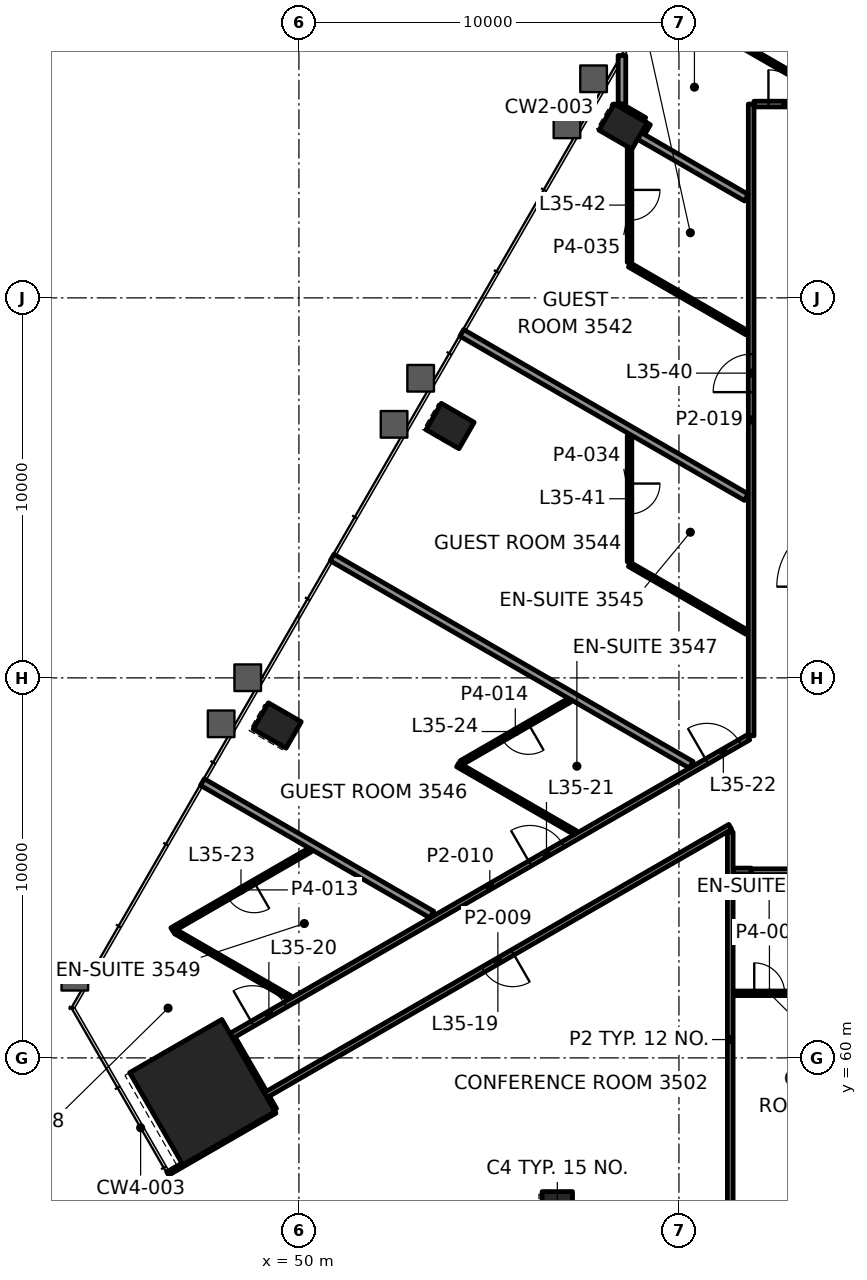
"""IFC4 building model, lengths in metres.
Left out: names, types, materials, properties, quantities, classifications, styles, units other than length and angle.
Written with IfcOpenShell. Run it as: python <this file> out.ifc"""

import sys

from ifc_helpers import new_model, si_unit, direction, frame, frame_2d, origin, origin_2d, place, context, subcontext, project, spatial, rectangle, hollow_rectangle, extrude, element, fill, save


model = new_model("IFC4")
c1 = context("Model", 3, precision=1e-05, world=origin(), true_north=direction((0.0, 1.0)))
c2 = subcontext(c1, "Body", "Model", "MODEL_VIEW")
j1 = project(units=[si_unit("LENGTHUNIT", "METRE"), si_unit("PLANEANGLEUNIT", "RADIAN")], contexts=[c1])
p1 = place(None, origin())
s1 = spatial("IfcSite", under=j1, at=p1, CompositionType="ELEMENT")
p2 = place(p1, origin())
s2 = spatial("IfcBuilding", under=s1, at=p2, CompositionType="ELEMENT")
p3 = place(p2, frame((0.0, 0.0, 155.8)))
s3 = spatial("IfcBuildingStorey", under=s2, at=p3, CompositionType="ELEMENT", Elevation=155.8)
p4 = place(p3, frame((47.459, 59.099, 0.0), z_axis=(0.0, 0.0, 1.0), x_axis=(0.5, -0.866025403784, 0.0)))
e1 = element("IfcColumn", 1, at=p4, inside=s3, PredefinedType="COLUMN", context=c2, shape_type="SweptSolid", body=[
    extrude(rectangle(XDim=2.8, YDim=2.8, at=origin_2d()), origin(), (0.0, 0.0, 1.0), 3.9),
])
for number, where, z_axis, x_axis in (
    (2, (56.8, 55.981, -0.0), (0.0, 0.0, 1.0), (1.0, 0.0, 0.0)),
    (3, (58.53, 84.509, -0.0), (0.0, 0.0, 1.0), (-0.5, -0.866, 0.0)),
    (4, (53.979, 76.628, -0.0), (0.0, 0.0, 1.0), (-0.5, -0.866, 0.0)),
    (5, (49.429, 68.748, -0.0), (0.0, 0.0, 1.0), (-0.5, -0.866, 0.0)),
):
    element("IfcColumn", number, at=place(p3, frame(where, z_axis=z_axis, x_axis=x_axis)), inside=s3, PredefinedType="COLUMN", context=c2, shape_type="SweptSolid", body=[
        extrude(hollow_rectangle(XDim=0.8, YDim=1.0, WallThickness=0.05, at=origin_2d()), origin(), (0.0, 0.0, 1.0), 3.9),
    ])
p5 = place(p3, frame((61.425, 61.7, 0.0), z_axis=(0.0, 0.0, 1.0), x_axis=(1.0, 0.0, 0.0)))
e6 = element("IfcWall", 6, at=p5, inside=s3, PredefinedType="PARTITIONING", context=c2, shape_type="SweptSolid", body=[
    extrude(rectangle(XDim=1.912, YDim=0.12, at=frame_2d((0.956, 0.0))), origin(), (0.0, 0.0, 1.0), 3.1),
])
p6 = place(p5, frame((0.556, 0.0, 0.0)))
e7 = element("IfcOpeningElement", 7, at=p6, cuts=e6, PredefinedType="OPENING", context=c2, shape_type="SweptSolid", body=[
    extrude(rectangle(XDim=0.8, YDim=2.1, at=frame_2d((0.4, 1.05))), frame((0.0, 0.07, 0.0), z_axis=(0.0, -1.0, 0.0), x_axis=(1.0, 0.0, 0.0)), (0.0, 0.0, 1.0), 0.14),
])
p7 = place(p3, frame((88.1, 64.9, 0.0), z_axis=(0.0, 0.0, 1.0), x_axis=(-1.0, 0.0, 0.0)))
e8 = element("IfcWall", 8, at=p7, inside=s3, PredefinedType="PARTITIONING", context=c2, shape_type="SweptSolid", body=[
    extrude(rectangle(XDim=26.2, YDim=0.15, at=frame_2d((13.1, 0.0))), origin(), (0.0, 0.0, 1.0), 3.1),
])
p8 = place(p7, frame((1.602, 0.0, 0.0)))
e9 = element("IfcOpeningElement", 9, at=p8, cuts=e8, PredefinedType="OPENING", context=c2, shape_type="SweptSolid", body=[
    extrude(rectangle(XDim=1.0, YDim=2.1, at=frame_2d((0.5, 1.05))), frame((0.0, 0.085, 0.0), z_axis=(0.0, -1.0, 0.0), x_axis=(1.0, 0.0, 0.0)), (0.0, 0.0, 1.0), 0.17),
])
p9 = place(p7, frame((4.411, 0.0, 0.0)))
e10 = element("IfcOpeningElement", 10, at=p9, cuts=e8, PredefinedType="OPENING", context=c2, shape_type="SweptSolid", body=[
    extrude(rectangle(XDim=1.0, YDim=2.1, at=frame_2d((0.5, 1.05))), frame((0.0, 0.085, 0.0), z_axis=(0.0, -1.0, 0.0), x_axis=(1.0, 0.0, 0.0)), (0.0, 0.0, 1.0), 0.17),
])
p10 = place(p7, frame((12.081, 0.0, 0.0)))
e11 = element("IfcOpeningElement", 11, at=p10, cuts=e8, PredefinedType="OPENING", context=c2, shape_type="SweptSolid", body=[
    extrude(rectangle(XDim=0.9, YDim=2.1, at=frame_2d((0.45, 1.05))), frame((0.0, 0.085, 0.0), z_axis=(0.0, -1.0, 0.0), x_axis=(1.0, 0.0, 0.0)), (0.0, 0.0, 1.0), 0.17),
])
p11 = place(p7, frame((15.494, 0.0, 0.0)))
e12 = element("IfcOpeningElement", 12, at=p11, cuts=e8, PredefinedType="OPENING", context=c2, shape_type="SweptSolid", body=[
    extrude(rectangle(XDim=0.9, YDim=2.1, at=frame_2d((0.45, 1.05))), frame((0.0, 0.085, 0.0), z_axis=(0.0, -1.0, 0.0), x_axis=(1.0, 0.0, 0.0)), (0.0, 0.0, 1.0), 0.17),
])
p12 = place(p7, frame((17.873, 0.0, 0.0)))
e13 = element("IfcOpeningElement", 13, at=p12, cuts=e8, PredefinedType="OPENING", context=c2, shape_type="SweptSolid", body=[
    extrude(rectangle(XDim=1.0, YDim=2.1, at=frame_2d((0.5, 1.05))), frame((0.0, 0.085, 0.0), z_axis=(0.0, -1.0, 0.0), x_axis=(1.0, 0.0, 0.0)), (0.0, 0.0, 1.0), 0.17),
])
p13 = place(p7, frame((22.423, 0.0, 0.0)))
e14 = element("IfcOpeningElement", 14, at=p13, cuts=e8, PredefinedType="OPENING", context=c2, shape_type="SweptSolid", body=[
    extrude(rectangle(XDim=1.0, YDim=2.1, at=frame_2d((0.5, 1.05))), frame((0.0, 0.085, 0.0), z_axis=(0.0, -1.0, 0.0), x_axis=(1.0, 0.0, 0.0)), (0.0, 0.0, 1.0), 0.17),
])
p14 = place(p3, frame((61.425, 64.919, 0.0), z_axis=(0.0, 0.0, 1.0), x_axis=(1.0, 0.0, 0.0)))
e15 = element("IfcWall", 15, at=p14, inside=s3, PredefinedType="PARTITIONING", context=c2, shape_type="SweptSolid", body=[
    extrude(rectangle(XDim=0.475, YDim=0.15, at=frame_2d((0.237, 0.0))), origin(), (0.0, 0.0, 1.0), 3.1),
])
p15 = place(p3, frame((61.975, 85.1, 0.0), z_axis=(0.0, 0.0, 1.0), x_axis=(1.0, 0.0, 0.0)))
e16 = element("IfcWall", 16, at=p15, inside=s3, PredefinedType="PARTITIONING", context=c2, shape_type="SweptSolid", body=[
    extrude(rectangle(XDim=9.181, YDim=0.15, at=frame_2d((4.591, 0.0))), origin(), (0.0, 0.0, 1.0), 3.1),
])
p16 = place(p15, frame((0.38, 0.0, 0.0)))
e17 = element("IfcOpeningElement", 17, at=p16, cuts=e16, PredefinedType="OPENING", context=c2, shape_type="SweptSolid", body=[
    extrude(rectangle(XDim=0.9, YDim=2.1, at=frame_2d((0.45, 1.05))), frame((0.0, 0.085, 0.0), z_axis=(0.0, -1.0, 0.0), x_axis=(1.0, 0.0, 0.0)), (0.0, 0.0, 1.0), 0.17),
])
p17 = place(p15, frame((5.216, 0.0, 0.0)))
e18 = element("IfcOpeningElement", 18, at=p17, cuts=e16, PredefinedType="OPENING", context=c2, shape_type="SweptSolid", body=[
    extrude(rectangle(XDim=0.9, YDim=2.1, at=frame_2d((0.45, 1.05))), frame((0.0, 0.085, 0.0), z_axis=(0.0, -1.0, 0.0), x_axis=(1.0, 0.0, 0.0)), (0.0, 0.0, 1.0), 0.17),
])
p18 = place(p3, frame((46.548, 56.957, 0.0), z_axis=(0.0, 0.0, 1.0), x_axis=(0.866035906198, 0.499981808845, 0.0)))
e19 = element("IfcWall", 19, at=p18, inside=s3, PredefinedType="PARTITIONING", context=c2, shape_type="SweptSolid", body=[
    extrude(rectangle(XDim=3.259, YDim=0.1, at=frame_2d((1.63, 0.0))), origin(), (0.0, 0.0, 1.0), 3.1),
])
p19 = place(p3, frame((61.35, 66.08, 0.0), z_axis=(0.0, 0.0, 1.0), x_axis=(-0.86602031485, -0.50000881419, 0.0)))
e20 = element("IfcWall", 20, at=p19, inside=s3, PredefinedType="PARTITIONING", context=c2, shape_type="SweptSolid", body=[
    extrude(rectangle(XDim=14.12, YDim=0.15, at=frame_2d((7.06, 0.0))), origin(), (0.0, 0.0, 1.0), 2.947),
])
p20 = place(p19, frame((6.61, 0.0, 0.0)))
e21 = element("IfcOpeningElement", 21, at=p20, cuts=e20, PredefinedType="OPENING", context=c2, shape_type="SweptSolid", body=[
    extrude(rectangle(XDim=0.9, YDim=2.1, at=frame_2d((0.45, 1.05))), frame((0.0, 0.085, 0.0), z_axis=(0.0, -1.0, 0.0), x_axis=(1.0, 0.0, 0.0)), (0.0, 0.0, 1.0), 0.17),
])
p21 = place(p3, frame((48.222, 60.579, 0.0), z_axis=(0.0, 0.0, 1.0), x_axis=(0.866027958894, 0.499995574394, 0.0)))
e22 = element("IfcWall", 22, at=p21, inside=s3, PredefinedType="PARTITIONING", context=c2, shape_type="SweptSolid", body=[
    extrude(rectangle(XDim=15.708, YDim=0.15, at=frame_2d((7.854, 0.0))), origin(), (0.0, 0.0, 1.0), 3.1),
])
p22 = place(p21, frame((0.641, 0.0, 0.0)))
e23 = element("IfcOpeningElement", 23, at=p22, cuts=e22, PredefinedType="OPENING", context=c2, shape_type="SweptSolid", body=[
    extrude(rectangle(XDim=1.0, YDim=2.1, at=frame_2d((0.5, 1.05))), frame((0.0, 0.085, 0.0), z_axis=(0.0, -1.0, 0.0), x_axis=(1.0, 0.0, 0.0)), (0.0, 0.0, 1.0), 0.17),
])
p23 = place(p21, frame((9.075, 0.0, 0.0)))
e24 = element("IfcOpeningElement", 24, at=p23, cuts=e22, PredefinedType="OPENING", context=c2, shape_type="SweptSolid", body=[
    extrude(rectangle(XDim=1.0, YDim=2.1, at=frame_2d((0.5, 1.05))), frame((0.0, 0.085, 0.0), z_axis=(0.0, -1.0, 0.0), x_axis=(1.0, 0.0, 0.0)), (0.0, 0.0, 1.0), 0.17),
])
p24 = place(p21, frame((14.449, 0.0, 0.0)))
e25 = element("IfcOpeningElement", 25, at=p24, cuts=e22, PredefinedType="OPENING", context=c2, shape_type="SweptSolid", body=[
    extrude(rectangle(XDim=1.0, YDim=2.1, at=frame_2d((0.5, 1.05))), frame((0.0, 0.085, 0.0), z_axis=(0.0, -1.0, 0.0), x_axis=(1.0, 0.0, 0.0)), (0.0, 0.0, 1.0), 0.17),
])
p25 = place(p3, frame((50.29, 65.468, 0.0), z_axis=(0.0, 0.0, 1.0), x_axis=(-0.866011945653, -0.500023309443, 0.0)))
e26 = element("IfcWall", 26, at=p25, inside=s3, PredefinedType="PARTITIONING", context=c2, shape_type="SweptSolid", body=[
    extrude(rectangle(XDim=4.191, YDim=0.12, at=frame_2d((2.096, 0.0))), origin(), (0.0, 0.0, 1.0), 3.1),
])
p26 = place(p25, frame((1.696, 0.0, 0.0)))
e27 = element("IfcOpeningElement", 27, at=p26, cuts=e26, PredefinedType="OPENING", context=c2, shape_type="SweptSolid", body=[
    extrude(rectangle(XDim=0.8, YDim=2.1, at=frame_2d((0.4, 1.05))), frame((0.0, 0.07, 0.0), z_axis=(0.0, -1.0, 0.0), x_axis=(1.0, 0.0, 0.0)), (0.0, 0.0, 1.0), 0.14),
])
p27 = place(p3, frame((57.115, 69.409, 0.0), z_axis=(0.0, 0.0, 1.0), x_axis=(-0.866004692627, -0.500035871061, 0.0)))
e28 = element("IfcWall", 28, at=p27, inside=s3, PredefinedType="PARTITIONING", context=c2, shape_type="SweptSolid", body=[
    extrude(rectangle(XDim=3.281, YDim=0.12, at=frame_2d((1.641, 0.0))), origin(), (0.0, 0.0, 1.0), 3.1),
])
p28 = place(p27, frame((1.241, 0.0, 0.0)))
e29 = element("IfcOpeningElement", 29, at=p28, cuts=e28, PredefinedType="OPENING", context=c2, shape_type="SweptSolid", body=[
    extrude(rectangle(XDim=0.8, YDim=2.1, at=frame_2d((0.4, 1.05))), frame((0.0, 0.07, 0.0), z_axis=(0.0, -1.0, 0.0), x_axis=(1.0, 0.0, 0.0)), (0.0, 0.0, 1.0), 0.14),
])
p29 = place(p3, frame((59.017, 84.355, 0.0), z_axis=(0.0, 0.0, 1.0), x_axis=(0.500038750527, 0.866003030001, 0.0)))
e30 = element("IfcWall", 30, at=p29, inside=s3, PredefinedType="PARTITIONING", context=c2, shape_type="SweptSolid", body=[
    extrude(rectangle(XDim=0.29, YDim=0.2, at=frame_2d((0.145, 0.0))), origin(), (0.0, 0.0, 1.0), 3.1),
])
p30 = place(p3, frame((61.9, 68.476, 0.0), z_axis=(0.0, 0.0, 1.0), x_axis=(0.0, 1.0, 0.0)))
e31 = element("IfcWall", 31, at=p30, inside=s3, PredefinedType="PARTITIONING", context=c2, shape_type="SweptSolid", body=[
    extrude(rectangle(XDim=16.624, YDim=0.15, at=frame_2d((8.312, 0.0))), origin(), (0.0, 0.0, 1.0), 3.1),
])
p31 = place(p30, frame((9.043, 0.0, 0.0)))
e32 = element("IfcOpeningElement", 32, at=p31, cuts=e31, PredefinedType="OPENING", context=c2, shape_type="SweptSolid", body=[
    extrude(rectangle(XDim=1.0, YDim=2.1, at=frame_2d((0.5, 1.05))), frame((0.0, 0.085, 0.0), z_axis=(0.0, -1.0, 0.0), x_axis=(1.0, 0.0, 0.0)), (0.0, 0.0, 1.0), 0.17),
])
p32 = place(p3, frame((61.35, 55.021, 0.0), z_axis=(0.0, 0.0, 1.0), x_axis=(0.0, 1.0, 0.0)))
e33 = element("IfcWall", 33, at=p32, inside=s3, PredefinedType="PARTITIONING", context=c2, shape_type="SweptSolid", body=[
    extrude(rectangle(XDim=10.922, YDim=0.15, at=frame_2d((5.461, 0.0))), origin(), (0.0, 0.0, 1.0), 2.865),
])
p33 = place(p3, frame((58.7, 76.375, 0.0), z_axis=(0.0, 0.0, 1.0), x_axis=(0.0, -1.0, 0.0)))
e34 = element("IfcWall", 34, at=p33, inside=s3, PredefinedType="PARTITIONING", context=c2, shape_type="SweptSolid", body=[
    extrude(rectangle(XDim=3.322, YDim=0.12, at=frame_2d((1.661, 0.0))), origin(), (0.0, 0.0, 1.0), 3.1),
])
p34 = place(p33, frame((1.261, 0.0, 0.0)))
e35 = element("IfcOpeningElement", 35, at=p34, cuts=e34, PredefinedType="OPENING", context=c2, shape_type="SweptSolid", body=[
    extrude(rectangle(XDim=0.8, YDim=2.1, at=frame_2d((0.4, 1.05))), frame((0.0, 0.07, 0.0), z_axis=(0.0, -1.0, 0.0), x_axis=(1.0, 0.0, 0.0)), (0.0, 0.0, 1.0), 0.14),
])
p35 = place(p3, frame((58.7, 83.949, 0.0), z_axis=(0.0, 0.0, 1.0), x_axis=(0.0, -1.0, 0.0)))
e36 = element("IfcWall", 36, at=p35, inside=s3, PredefinedType="PARTITIONING", context=c2, shape_type="SweptSolid", body=[
    extrude(rectangle(XDim=3.015, YDim=0.12, at=frame_2d((1.508, 0.0))), origin(), (0.0, 0.0, 1.0), 3.1),
])
p36 = place(p35, frame((1.108, 0.0, 0.0)))
e37 = element("IfcOpeningElement", 37, at=p36, cuts=e36, PredefinedType="OPENING", context=c2, shape_type="SweptSolid", body=[
    extrude(rectangle(XDim=0.8, YDim=2.1, at=frame_2d((0.4, 1.05))), frame((0.0, 0.07, 0.0), z_axis=(0.0, -1.0, 0.0), x_axis=(1.0, 0.0, 0.0)), (0.0, 0.0, 1.0), 0.14),
])
p37 = place(p3, frame((58.5, 85.104, 0.0), z_axis=(0.0, 0.0, 1.0), x_axis=(0.0, 1.0, 0.0)))
e38 = element("IfcWall", 38, at=p37, inside=s3, PredefinedType="PARTITIONING", context=c2, shape_type="SweptSolid", body=[
    extrude(rectangle(XDim=1.274, YDim=0.2, at=frame_2d((0.637, 0.0))), origin(), (0.0, 0.0, 1.0), 3.1),
])
p38 = place(p3, frame((49.346, 58.63, 0.0), z_axis=(0.0, 0.0, 1.0), x_axis=(-0.499854089722, 0.866109628736, 0.0)))
e39 = element("IfcWall", 39, at=p38, inside=s3, PredefinedType="PARTITIONING", context=c2, shape_type="SweptSolid", body=[
    extrude(rectangle(XDim=0.375, YDim=0.15, at=frame_2d((0.187, 0.0))), origin(), (0.0, 0.0, 1.0), 3.1),
])
p39 = place(p3, frame((64.106, 85.23, 0.0), z_axis=(0.0, 0.0, 1.0), x_axis=(-0.866029080648, 0.499993631431, 0.0)))
e40 = element("IfcWall", 40, at=p39, inside=s3, PredefinedType="PARTITIONING", context=c2, shape_type="SweptSolid", body=[
    extrude(rectangle(XDim=5.429, YDim=0.12, at=frame_2d((2.715, 0.0))), origin(), (0.0, 0.0, 1.0), 2.865),
])
p40 = place(p3, frame((59.075, 84.656, 0.0), z_axis=(0.0, 0.0, 1.0), x_axis=(-0.866063163075, 0.499934593286, 0.0)))
e41 = element("IfcWall", 41, at=p40, inside=s3, PredefinedType="PARTITIONING", context=c2, shape_type="SweptSolid", body=[
    extrude(rectangle(XDim=0.664, YDim=0.2, at=frame_2d((0.332, 0.0))), origin(), (0.0, 0.0, 1.0), 2.865),
])
p41 = place(p3, frame((61.773, 82.637, 0.0), z_axis=(0.0, 0.0, 1.0), x_axis=(-0.866059071022, 0.4999416821, 0.0)))
e42 = element("IfcWall", 42, at=p41, inside=s3, PredefinedType="PARTITIONING", context=c2, shape_type="SweptSolid", body=[
    extrude(rectangle(XDim=3.246, YDim=0.2, at=frame_2d((1.623, 0.0))), origin(), (0.0, 0.0, 1.0), 3.1),
])
p42 = place(p3, frame((61.791, 79.081, 0.0), z_axis=(0.0, 0.0, 1.0), x_axis=(-0.866028357664, 0.499994883695, 0.0)))
e43 = element("IfcWall", 43, at=p42, inside=s3, PredefinedType="PARTITIONING", context=c2, shape_type="SweptSolid", body=[
    extrude(rectangle(XDim=3.568, YDim=0.12, at=frame_2d((1.784, 0.0))), origin(), (0.0, 0.0, 1.0), 3.1),
])
p43 = place(p3, frame((61.773, 74.756, 0.0), z_axis=(0.0, 0.0, 1.0), x_axis=(-0.866022413045, 0.500005180077, 0.0)))
e44 = element("IfcWall", 44, at=p43, inside=s3, PredefinedType="PARTITIONING", context=c2, shape_type="SweptSolid", body=[
    extrude(rectangle(XDim=8.646, YDim=0.2, at=frame_2d((4.323, 0.0))), origin(), (0.0, 0.0, 1.0), 2.865),
])
p44 = place(p3, frame((61.791, 71.2, 0.0), z_axis=(0.0, 0.0, 1.0), x_axis=(-0.866028357664, 0.499994883695, 0.0)))
e45 = element("IfcWall", 45, at=p44, inside=s3, PredefinedType="PARTITIONING", context=c2, shape_type="SweptSolid", body=[
    extrude(rectangle(XDim=3.568, YDim=0.12, at=frame_2d((1.784, 0.0))), origin(), (0.0, 0.0, 1.0), 3.1),
])
p45 = place(p3, frame((60.323, 67.712, 0.0), z_axis=(0.0, 0.0, 1.0), x_axis=(-0.866020529357, 0.500008442661, 0.0)))
e46 = element("IfcWall", 46, at=p45, inside=s3, PredefinedType="PARTITIONING", context=c2, shape_type="SweptSolid", body=[
    extrude(rectangle(XDim=10.912, YDim=0.2, at=frame_2d((5.456, 0.0))), origin(), (0.0, 0.0, 1.0), 2.865),
])
p46 = place(p3, frame((57.269, 65.929, 0.0), z_axis=(0.0, 0.0, 1.0), x_axis=(-0.866028357664, 0.499994883695, 0.0)))
e47 = element("IfcWall", 47, at=p46, inside=s3, PredefinedType="PARTITIONING", context=c2, shape_type="SweptSolid", body=[
    extrude(rectangle(XDim=3.568, YDim=0.12, at=frame_2d((1.784, 0.0))), origin(), (0.0, 0.0, 1.0), 3.1),
])
p47 = place(p3, frame((53.498, 63.772, 0.0), z_axis=(0.0, 0.0, 1.0), x_axis=(-0.866014709899, 0.500018521895, 0.0)))
e48 = element("IfcWall", 48, at=p47, inside=s3, PredefinedType="PARTITIONING", context=c2, shape_type="SweptSolid", body=[
    extrude(rectangle(XDim=6.971, YDim=0.2, at=frame_2d((3.486, 0.0))), origin(), (0.0, 0.0, 1.0), 3.1),
])
p48 = place(p3, frame((49.751, 61.589, 0.0), z_axis=(0.0, 0.0, 1.0), x_axis=(-0.865997524453, 0.50004828531, 0.0)))
e49 = element("IfcWall", 49, at=p48, inside=s3, PredefinedType="PARTITIONING", context=c2, shape_type="SweptSolid", body=[
    extrude(rectangle(XDim=3.459, YDim=0.12, at=frame_2d((1.729, 0.0))), origin(), (0.0, 0.0, 1.0), 3.1),
])
p49 = place(p3, frame((49.084, 59.085, 0.0), z_axis=(0.0, 0.0, 1.0), x_axis=(-0.499991515992, 0.866030301974, 0.0)))
e50 = element("IfcWall", 50, at=p49, inside=s3, PredefinedType="PARTITIONING", context=c2, shape_type="SweptSolid", body=[
    extrude(rectangle(XDim=1.649, YDim=0.15, at=frame_2d((0.825, 0.0))), origin(), (0.0, 0.0, 1.0), 2.947),
])
p50 = place(p6, origin())
e51 = element("IfcDoor", 51, at=p50, inside=s3, OperationType="SINGLE_SWING_LEFT", PredefinedType="DOOR", context=c2, shape_type="SweptSolid", body=[
    extrude(rectangle(XDim=0.8, YDim=2.1, at=frame_2d((0.4, 1.05))), frame((0.0, 0.025, 0.0), z_axis=(0.0, -1.0, 0.0), x_axis=(1.0, 0.0, 0.0)), (0.0, 0.0, 1.0), 0.05),
])
fill(e7, e51)
p51 = place(p16, origin())
e52 = element("IfcDoor", 52, at=p51, inside=s3, OperationType="SINGLE_SWING_RIGHT", PredefinedType="DOOR", context=c2, shape_type="SweptSolid", body=[
    extrude(rectangle(XDim=0.9, YDim=2.1, at=frame_2d((0.45, 1.05))), frame((0.0, 0.025, 0.0), z_axis=(0.0, -1.0, 0.0), x_axis=(1.0, 0.0, 0.0)), (0.0, 0.0, 1.0), 0.05),
])
fill(e17, e52)
p52 = place(p20, origin())
e53 = element("IfcDoor", 53, at=p52, inside=s3, OperationType="SINGLE_SWING_RIGHT", PredefinedType="DOOR", context=c2, shape_type="SweptSolid", body=[
    extrude(rectangle(XDim=0.9, YDim=2.1, at=frame_2d((0.45, 1.05))), frame((0.0, 0.025, 0.0), z_axis=(0.0, -1.0, 0.0), x_axis=(1.0, 0.0, 0.0)), (0.0, 0.0, 1.0), 0.05),
])
fill(e21, e53)
p53 = place(p22, origin())
e54 = element("IfcDoor", 54, at=p53, inside=s3, OperationType="SINGLE_SWING_LEFT", PredefinedType="DOOR", context=c2, shape_type="SweptSolid", body=[
    extrude(rectangle(XDim=1.0, YDim=2.1, at=frame_2d((0.5, 1.05))), frame((0.0, 0.025, 0.0), z_axis=(0.0, -1.0, 0.0), x_axis=(1.0, 0.0, 0.0)), (0.0, 0.0, 1.0), 0.05),
])
fill(e23, e54)
p54 = place(p23, origin())
e55 = element("IfcDoor", 55, at=p54, inside=s3, OperationType="SINGLE_SWING_LEFT", PredefinedType="DOOR", context=c2, shape_type="SweptSolid", body=[
    extrude(rectangle(XDim=1.0, YDim=2.1, at=frame_2d((0.5, 1.05))), frame((0.0, 0.025, 0.0), z_axis=(0.0, -1.0, 0.0), x_axis=(1.0, 0.0, 0.0)), (0.0, 0.0, 1.0), 0.05),
])
fill(e24, e55)
p55 = place(p24, origin())
e56 = element("IfcDoor", 56, at=p55, inside=s3, OperationType="SINGLE_SWING_LEFT", PredefinedType="DOOR", context=c2, shape_type="SweptSolid", body=[
    extrude(rectangle(XDim=1.0, YDim=2.1, at=frame_2d((0.5, 1.05))), frame((0.0, 0.025, 0.0), z_axis=(0.0, -1.0, 0.0), x_axis=(1.0, 0.0, 0.0)), (0.0, 0.0, 1.0), 0.05),
])
fill(e25, e56)
p56 = place(p26, origin())
e57 = element("IfcDoor", 57, at=p56, inside=s3, OperationType="SINGLE_SWING_LEFT", PredefinedType="DOOR", context=c2, shape_type="SweptSolid", body=[
    extrude(rectangle(XDim=0.8, YDim=2.1, at=frame_2d((0.4, 1.05))), frame((0.0, 0.025, 0.0), z_axis=(0.0, -1.0, 0.0), x_axis=(1.0, 0.0, 0.0)), (0.0, 0.0, 1.0), 0.05),
])
fill(e27, e57)
p57 = place(p28, origin())
e58 = element("IfcDoor", 58, at=p57, inside=s3, OperationType="SINGLE_SWING_LEFT", PredefinedType="DOOR", context=c2, shape_type="SweptSolid", body=[
    extrude(rectangle(XDim=0.8, YDim=2.1, at=frame_2d((0.4, 1.05))), frame((0.0, 0.025, 0.0), z_axis=(0.0, -1.0, 0.0), x_axis=(1.0, 0.0, 0.0)), (0.0, 0.0, 1.0), 0.05),
])
fill(e29, e58)
p58 = place(p31, origin())
e59 = element("IfcDoor", 59, at=p58, inside=s3, OperationType="SINGLE_SWING_LEFT", PredefinedType="DOOR", context=c2, shape_type="SweptSolid", body=[
    extrude(rectangle(XDim=1.0, YDim=2.1, at=frame_2d((0.5, 1.05))), frame((0.0, 0.025, 0.0), z_axis=(0.0, -1.0, 0.0), x_axis=(1.0, 0.0, 0.0)), (0.0, 0.0, 1.0), 0.05),
])
fill(e32, e59)
p59 = place(p34, origin())
e60 = element("IfcDoor", 60, at=p59, inside=s3, OperationType="SINGLE_SWING_LEFT", PredefinedType="DOOR", context=c2, shape_type="SweptSolid", body=[
    extrude(rectangle(XDim=0.8, YDim=2.1, at=frame_2d((0.4, 1.05))), frame((0.0, 0.025, 0.0), z_axis=(0.0, -1.0, 0.0), x_axis=(1.0, 0.0, 0.0)), (0.0, 0.0, 1.0), 0.05),
])
fill(e35, e60)
p60 = place(p36, origin())
e61 = element("IfcDoor", 61, at=p60, inside=s3, OperationType="SINGLE_SWING_LEFT", PredefinedType="DOOR", context=c2, shape_type="SweptSolid", body=[
    extrude(rectangle(XDim=0.8, YDim=2.1, at=frame_2d((0.4, 1.05))), frame((0.0, 0.025, 0.0), z_axis=(0.0, -1.0, 0.0), x_axis=(1.0, 0.0, 0.0)), (0.0, 0.0, 1.0), 0.05),
])
fill(e37, e61)
save(model, sys.argv[1])
